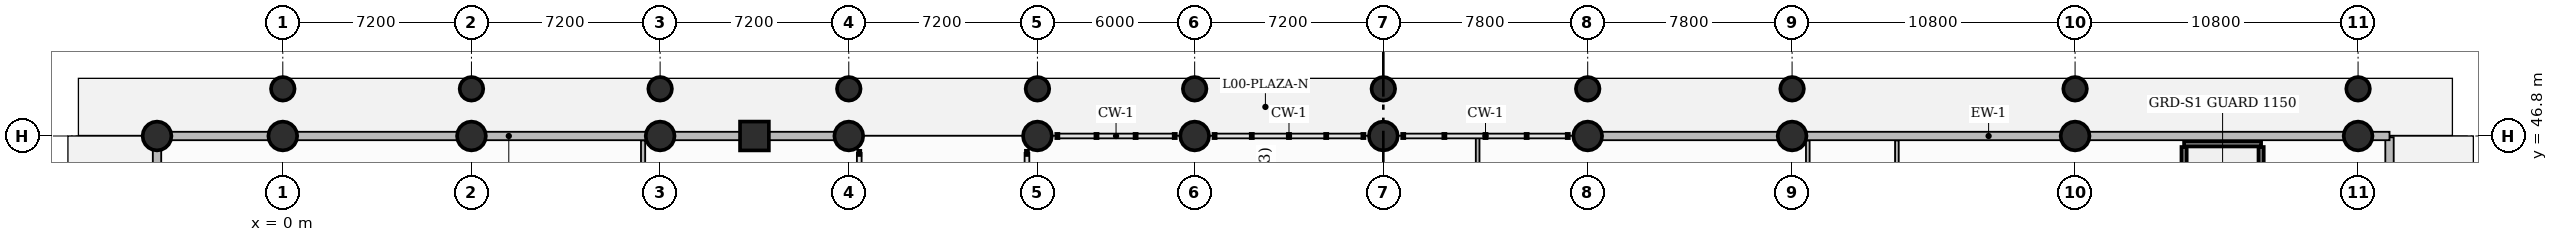
"""IFC4 building model, lengths in metres.
Left out: names, types, materials, properties, quantities, classifications, styles, units other than length and angle.
Written with IfcOpenShell. Run it as: python <this file> out.ifc"""

import sys

from ifc_helpers import new_model, si_unit, direction, frame, frame_2d, origin, origin_2d, place, context, subcontext, project, spatial, rectangle, circle, extrude, source, transform, mapped, element, save


model = new_model("IFC4")
c1 = context("Model", 3, precision=1e-05, world=origin(), true_north=direction((0.0, 1.0)))
c2 = subcontext(c1, "Body", "Model", "MODEL_VIEW")
j1 = project(units=[si_unit("LENGTHUNIT", "METRE"), si_unit("PLANEANGLEUNIT", "RADIAN")], contexts=[c1])
p1 = place(None, origin())
s1 = spatial("IfcSite", under=j1, at=p1, CompositionType="ELEMENT")
p2 = place(p1, origin())
s2 = spatial("IfcBuilding", under=s1, at=p2, CompositionType="ELEMENT")
p3 = place(p2, origin())
s3 = spatial("IfcBuildingStorey", under=s2, at=p3, CompositionType="ELEMENT", Elevation=0.0)
m1 = source(origin(), c2, "Body", "SweptSolid", [
    extrude(circle(Radius=0.55, at=origin_2d()), origin(), (0.0, 0.0, 1.0), 5.4),
])
for number, where, z_axis, x_axis in (
    (1, (-4.8, 46.8, 0.0), (0.0, 0.0, 1.0), (1.0, 0.0, 0.0)),
    (2, (0.0, 46.8, 0.0), (0.0, 0.0, 1.0), (1.0, 0.0, 0.0)),
    (3, (7.2, 46.8, 0.0), (0.0, 0.0, 1.0), (1.0, 0.0, 0.0)),
    (4, (14.4, 46.8, 0.0), (0.0, 0.0, 1.0), (1.0, 0.0, 0.0)),
    (5, (21.6, 46.8, 0.0), (0.0, 0.0, 1.0), (1.0, 0.0, 0.0)),
    (6, (28.8, 46.8, 0.0), (0.0, 0.0, 1.0), (1.0, 0.0, 0.0)),
    (7, (34.8, 46.8, 0.0), (0.0, 0.0, 1.0), (1.0, 0.0, 0.0)),
    (8, (42.0, 46.8, 0.0), (0.0, 0.0, 1.0), (1.0, 0.0, 0.0)),
    (9, (49.8, 46.8, 0.0), (0.0, 0.0, 1.0), (1.0, 0.0, 0.0)),
    (10, (57.6, 46.8, 0.0), (0.0, 0.0, 1.0), (1.0, 0.0, 0.0)),
    (11, (68.4, 46.8, 0.0), (0.0, 0.0, 1.0), (1.0, 0.0, 0.0)),
    (12, (79.2, 46.8, 0.0), (0.0, 0.0, 1.0), (1.0, 0.0, 0.0)),
):
    element("IfcColumn", number, at=place(p3, frame(where, z_axis=z_axis, x_axis=x_axis)), inside=s3, PredefinedType="COLUMN", context=c2, shape_type="MappedRepresentation", body=[
        mapped(m1, transform((0.0, 0.0, 0.0), scale=1.0)),
    ])
m2 = source(origin(), c2, "Body", "SweptSolid", [
    extrude(circle(Radius=0.45, at=origin_2d()), origin(), (0.0, 0.0, 1.0), 5.4),
])
for number, where, z_axis, x_axis in (
    (13, (0.0, 48.6, 0.0), (0.0, 0.0, 1.0), (1.0, 0.0, 0.0)),
    (14, (7.2, 48.6, 0.0), (0.0, 0.0, 1.0), (1.0, 0.0, 0.0)),
    (15, (14.4, 48.6, 0.0), (0.0, 0.0, 1.0), (1.0, 0.0, 0.0)),
    (16, (21.6, 48.6, 0.0), (0.0, 0.0, 1.0), (1.0, 0.0, 0.0)),
    (17, (28.8, 48.6, 0.0), (0.0, 0.0, 1.0), (1.0, 0.0, 0.0)),
    (18, (34.8, 48.6, 0.0), (0.0, 0.0, 1.0), (1.0, 0.0, 0.0)),
    (19, (42.0, 48.6, 0.0), (0.0, 0.0, 1.0), (1.0, 0.0, 0.0)),
    (20, (49.8, 48.6, 0.0), (0.0, 0.0, 1.0), (1.0, 0.0, 0.0)),
    (21, (57.6, 48.6, 0.0), (0.0, 0.0, 1.0), (1.0, 0.0, 0.0)),
    (22, (68.4, 48.6, 0.0), (0.0, 0.0, 1.0), (1.0, 0.0, 0.0)),
    (23, (79.2, 48.6, 0.0), (0.0, 0.0, 1.0), (1.0, 0.0, 0.0)),
):
    element("IfcColumn", number, at=place(p3, frame(where, z_axis=z_axis, x_axis=x_axis)), inside=s3, PredefinedType="COLUMN", context=c2, shape_type="MappedRepresentation", body=[
        mapped(m2, transform((0.0, 0.0, 0.0), scale=1.0)),
    ])
m3 = source(origin(), c2, "Body", "SweptSolid", [
    extrude(rectangle(XDim=1.1, YDim=1.1, at=origin_2d()), origin(), (0.0, 0.0, 1.0), 5.4),
])
p4 = place(p3, frame((18.0, 46.8, 0.0), z_axis=(0.0, 0.0, 1.0), x_axis=(1.0, 0.0, 0.0)))
e24 = element("IfcColumn", 24, at=p4, inside=s3, PredefinedType="COLUMN", context=c2, shape_type="MappedRepresentation", body=[
    mapped(m3, transform((0.0, 0.0, 0.0), scale=1.0)),
])
for number, where, z_axis, x_axis in (
    (25, (72.56, 39.47, 0.0), (0.0, 0.0, 1.0), (0.0, 1.0, 0.0)),
    (26, (75.5, 39.47, 0.0), (0.0, 0.0, 1.0), (0.0, 1.0, 0.0)),
):
    element("IfcWall", number, at=place(p3, frame(where, z_axis=z_axis, x_axis=x_axis)), inside=s3, PredefinedType="SHEAR", context=c2, shape_type="SweptSolid", body=[
        extrude(rectangle(XDim=6.91, YDim=0.2, at=frame_2d((3.455, 0.0))), origin(), (0.0, 0.0, 1.0), 5.4),
    ])
p5 = place(p3, frame((72.56, 46.5, 0.0), z_axis=(0.0, 0.0, 1.0), x_axis=(1.0, 0.0, 0.0)))
e27 = element("IfcWall", 27, at=p5, inside=s3, PredefinedType="SHEAR", context=c2, shape_type="SweptSolid", body=[
    extrude(rectangle(XDim=2.94, YDim=0.2, at=frame_2d((1.47, 0.0))), origin(), (0.0, 0.0, 1.0), 5.4),
])
p6 = place(p3, frame((45.6, 39.69, 0.0), z_axis=(0.0, 0.0, 1.0), x_axis=(0.0, 1.0, 0.0)))
e28 = element("IfcWall", 28, at=p6, inside=s3, PredefinedType="PARTITIONING", context=c2, shape_type="SweptSolid", body=[
    extrude(rectangle(XDim=7.082, YDim=0.14, at=frame_2d((3.541, 0.0))), origin(), (0.0, 0.0, 1.0), 5.1),
])
for number, where, z_axis, x_axis in (
    (29, (58.2, 39.69, 0.0), (0.0, 0.0, 1.0), (0.0, 1.0, 0.0)),
    (30, (61.6, 39.69, 0.0), (0.0, 0.0, 1.0), (0.0, 1.0, 0.0)),
):
    element("IfcWall", number, at=place(p3, frame(where, z_axis=z_axis, x_axis=x_axis)), inside=s3, PredefinedType="PARTITIONING", context=c2, shape_type="SweptSolid", body=[
        extrude(rectangle(XDim=6.942, YDim=0.14, at=frame_2d((3.471, 0.0))), origin(), (0.0, 0.0, 1.0), 5.1),
    ])
p7 = place(p3, frame((13.75, 39.69, 0.0), z_axis=(0.0, 0.0, 1.0), x_axis=(0.0, 1.0, 0.0)))
e31 = element("IfcWall", 31, at=p7, inside=s3, PredefinedType="PARTITIONING", context=c2, shape_type="SweptSolid", body=[
    extrude(rectangle(XDim=6.942, YDim=0.16, at=frame_2d((3.471, 0.0))), origin(), (0.0, 0.0, 1.0), 5.1),
])
p8 = place(p7, frame((2.61, 0.0, 0.0)))
e32 = element("IfcOpeningElement", 32, at=p8, cuts=e31, PredefinedType="OPENING", context=c2, shape_type="SweptSolid", body=[
    extrude(rectangle(XDim=1.4, YDim=2.35, at=frame_2d((0.7, 1.175))), frame((0.0, 0.09, 0.0), z_axis=(0.0, -1.0, 0.0), x_axis=(1.0, 0.0, 0.0)), (0.0, 0.0, 1.0), 0.18),
])
p9 = place(p3, frame((80.4, 0.05, 0.0), z_axis=(0.0, 0.0, 1.0), x_axis=(0.0, 1.0, 0.0)))
e33 = element("IfcWall", 33, at=p9, inside=s3, PredefinedType="SOLIDWALL", context=c2, shape_type="SweptSolid", body=[
    extrude(rectangle(XDim=46.7, YDim=0.32, at=frame_2d((23.35, 0.0))), origin(), (0.0, 0.0, 1.0), 5.1),
])
p10 = place(p9, frame((11.5, 0.0, 0.0)))
e34 = element("IfcOpeningElement", 34, at=p10, cuts=e33, PredefinedType="OPENING", context=c2, shape_type="SweptSolid", body=[
    extrude(rectangle(XDim=1.8, YDim=2.4, at=frame_2d((0.9, 1.2))), frame((0.0, 0.17, 0.0), z_axis=(0.0, -1.0, 0.0), x_axis=(1.0, 0.0, 0.0)), (0.0, 0.0, 1.0), 0.34),
])
p11 = place(p9, frame((16.75, 0.0, 0.0)))
e35 = element("IfcOpeningElement", 35, at=p11, cuts=e33, PredefinedType="OPENING", context=c2, shape_type="SweptSolid", body=[
    extrude(rectangle(XDim=2.4, YDim=2.8, at=frame_2d((1.2, 1.4))), frame((0.0, 0.17, 0.0), z_axis=(0.0, -1.0, 0.0), x_axis=(1.0, 0.0, 0.0)), (0.0, 0.0, 1.0), 0.34),
])
p12 = place(p9, frame((42.25, 0.0, 0.0)))
e36 = element("IfcOpeningElement", 36, at=p12, cuts=e33, PredefinedType="OPENING", context=c2, shape_type="SweptSolid", body=[
    extrude(rectangle(XDim=1.8, YDim=2.4, at=frame_2d((0.9, 1.2))), frame((0.0, 0.17, 0.0), z_axis=(0.0, -1.0, 0.0), x_axis=(1.0, 0.0, 0.0)), (0.0, 0.0, 1.0), 0.34),
])
p13 = place(p3, frame((-4.8, 46.8, 0.0), z_axis=(0.0, 0.0, 1.0), x_axis=(1.0, 0.0, 0.0)))
e37 = element("IfcWall", 37, at=p13, inside=s3, PredefinedType="SOLIDWALL", context=c2, shape_type="SweptSolid", body=[
    extrude(rectangle(XDim=26.85, YDim=0.32, at=frame_2d((13.425, 0.0))), origin(), (0.0, 0.0, 1.0), 4.085),
])
p14 = place(p3, frame((49.8, 46.8, 0.0), z_axis=(0.0, 0.0, 1.0), x_axis=(1.0, 0.0, 0.0)))
e38 = element("IfcWall", 38, at=p14, inside=s3, PredefinedType="SOLIDWALL", context=c2, shape_type="SweptSolid", body=[
    extrude(rectangle(XDim=30.6, YDim=0.32, at=frame_2d((15.3, 0.0))), origin(), (0.0, 0.0, 1.0), 4.085),
])
p15 = place(p3, frame((-4.8, 0.05, 0.0), z_axis=(0.0, 0.0, 1.0), x_axis=(0.0, 1.0, 0.0)))
e39 = element("IfcWall", 39, at=p15, inside=s3, PredefinedType="SOLIDWALL", context=c2, shape_type="SweptSolid", body=[
    extrude(rectangle(XDim=46.7, YDim=0.32, at=frame_2d((23.35, 0.0))), origin(), (0.0, 0.0, 1.0), 4.085),
])
p16 = place(p15, frame((16.75, 0.0, 0.0)))
e40 = element("IfcOpeningElement", 40, at=p16, cuts=e39, PredefinedType="OPENING", context=c2, shape_type="SweptSolid", body=[
    extrude(rectangle(XDim=2.4, YDim=2.8, at=frame_2d((1.2, 1.4))), frame((0.0, 0.17, 0.0), z_axis=(0.0, -1.0, 0.0), x_axis=(1.0, 0.0, 0.0)), (0.0, 0.0, 1.0), 0.34),
])
p17 = place(p15, frame((27.85, 0.0, 0.0)))
e41 = element("IfcOpeningElement", 41, at=p17, cuts=e39, PredefinedType="OPENING", context=c2, shape_type="SweptSolid", body=[
    extrude(rectangle(XDim=1.8, YDim=2.4, at=frame_2d((0.9, 1.2))), frame((0.0, 0.17, 0.0), z_axis=(0.0, -1.0, 0.0), x_axis=(1.0, 0.0, 0.0)), (0.0, 0.0, 1.0), 0.34),
])
p18 = place(p15, frame((35.05, 0.0, 0.0)))
e42 = element("IfcOpeningElement", 42, at=p18, cuts=e39, PredefinedType="OPENING", context=c2, shape_type="SweptSolid", body=[
    extrude(rectangle(XDim=1.8, YDim=2.4, at=frame_2d((0.9, 1.2))), frame((0.0, 0.17, 0.0), z_axis=(0.0, -1.0, 0.0), x_axis=(1.0, 0.0, 0.0)), (0.0, 0.0, 1.0), 0.34),
])
save(model, sys.argv[1])
